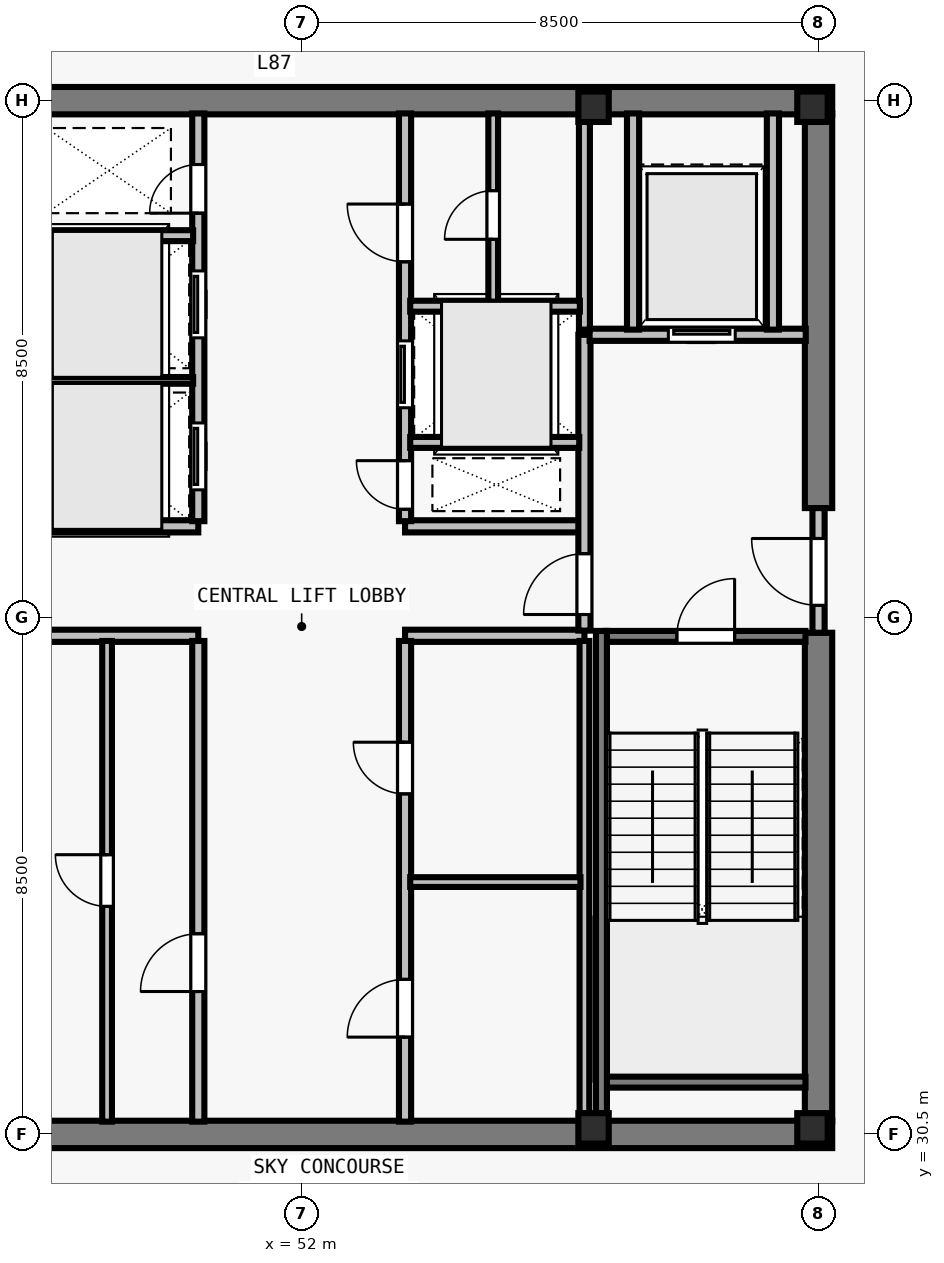
"""IFC4 building model, lengths in metres.
Left out: names, types, materials, properties, quantities, classifications, styles, units other than length and angle.
Written with IfcOpenShell. Run it as: python <this file> out.ifc"""

import sys

from ifc_helpers import new_model, si_unit, direction, frame, frame_2d, origin, origin_2d, place, context, subcontext, project, spatial, rectangle, i_section, extrude, element, fill, save


model = new_model("IFC4")
c1 = context("Model", 3, precision=1e-05, world=origin(), true_north=direction((0.0, 1.0)))
c2 = subcontext(c1, "Body", "Model", "MODEL_VIEW")
j1 = project(units=[si_unit("LENGTHUNIT", "METRE"), si_unit("PLANEANGLEUNIT", "RADIAN")], contexts=[c1])
p1 = place(None, origin())
s1 = spatial("IfcSite", under=j1, at=p1, CompositionType="ELEMENT")
p2 = place(p1, origin())
s2 = spatial("IfcBuilding", under=s1, at=p2, CompositionType="ELEMENT")
p3 = place(p2, frame((0.0, 0.0, 315.5)))
s3 = spatial("IfcBuildingStorey", under=s2, at=p3, CompositionType="ELEMENT", Elevation=315.5)
for number, where, z_axis, x_axis in (
    (1, (56.8, 30.6, 0.0), (0.0, 0.0, 1.0), (1.0, 0.0, 0.0)),
    (2, (60.4, 30.6, 0.0), (0.0, 0.0, 1.0), (1.0, 0.0, 0.0)),
    (3, (56.8, 47.4, 0.0), (0.0, 0.0, 1.0), (1.0, 0.0, 0.0)),
    (4, (60.4, 47.4, 0.0), (0.0, 0.0, 1.0), (1.0, 0.0, 0.0)),
):
    element("IfcColumn", number, at=place(p3, frame(where, z_axis=z_axis, x_axis=x_axis)), inside=s3, PredefinedType="COLUMN", context=c2, shape_type="SweptSolid", body=[
        extrude(i_section(OverallWidth=0.5, OverallDepth=0.5, WebThickness=0.028, FlangeThickness=0.045, at=origin_2d()), origin(), (0.0, 0.0, 1.0), 4.5),
    ])
for number, where, z_axis, x_axis in (
    (5, (43.275, 30.5, 0.0), (0.0, 0.0, 1.0), (1.0, 0.0, 0.0)),
    (6, (43.275, 47.5, 0.0), (0.0, 0.0, 1.0), (1.0, 0.0, 0.0)),
):
    element("IfcWall", number, at=place(p3, frame(where, z_axis=z_axis, x_axis=x_axis)), inside=s3, PredefinedType="SHEAR", context=c2, shape_type="SweptSolid", body=[
        extrude(rectangle(XDim=17.45, YDim=0.45, at=frame_2d((8.725, 0.0))), origin(), (0.0, 0.0, 1.0), 4.29),
    ])
p4 = place(p3, frame((60.5, 30.715, 0.0), z_axis=(0.0, 0.0, 1.0), x_axis=(0.0, 1.0, 0.0)))
e7 = element("IfcWall", 7, at=p4, inside=s3, PredefinedType="SHEAR", context=c2, shape_type="SweptSolid", body=[
    extrude(rectangle(XDim=8.035, YDim=0.45, at=frame_2d((4.018, 0.0))), origin(), (0.0, 0.0, 1.0), 4.29),
])
p5 = place(p3, frame((60.5, 40.8, 0.0), z_axis=(0.0, 0.0, 1.0), x_axis=(0.0, 1.0, 0.0)))
e8 = element("IfcWall", 8, at=p5, inside=s3, PredefinedType="SHEAR", context=c2, shape_type="SweptSolid", body=[
    extrude(rectangle(XDim=6.485, YDim=0.45, at=frame_2d((3.242, 0.0))), origin(), (0.0, 0.0, 1.0), 4.29),
])
for number, where, z_axis, x_axis in (
    (9, (47.35, 38.7, 0.0), (0.0, 0.0, 1.0), (1.0, 0.0, 0.0)),
    (10, (47.35, 40.5, 0.0), (0.0, 0.0, 1.0), (1.0, 0.0, 0.0)),
    (11, (53.7, 38.7, 0.0), (0.0, 0.0, 1.0), (1.0, 0.0, 0.0)),
    (12, (53.7, 40.5, 0.0), (0.0, 0.0, 1.0), (1.0, 0.0, 0.0)),
):
    element("IfcWall", number, at=place(p3, frame(where, z_axis=z_axis, x_axis=x_axis)), inside=s3, PredefinedType="SOLIDWALL", context=c2, shape_type="SweptSolid", body=[
        extrude(rectangle(XDim=2.95, YDim=0.2, at=frame_2d((1.475, 0.0))), origin(), (0.0, 0.0, 1.0), 4.29),
    ])
p6 = place(p3, frame((50.3, 30.71, 0.0), z_axis=(0.0, 0.0, 1.0), x_axis=(0.0, 1.0, 0.0)))
e13 = element("IfcWall", 13, at=p6, inside=s3, PredefinedType="SOLIDWALL", context=c2, shape_type="SweptSolid", body=[
    extrude(rectangle(XDim=7.905, YDim=0.2, at=frame_2d((3.953, 0.0))), origin(), (0.0, 0.0, 1.0), 4.29),
])
p7 = place(p6, frame((2.14, 0.0, 0.0)))
e14 = element("IfcOpeningElement", 14, at=p7, cuts=e13, PredefinedType="OPENING", context=c2, shape_type="SweptSolid", body=[
    extrude(rectangle(XDim=0.95, YDim=2.12, at=frame_2d((0.475, 1.06))), frame((0.0, 0.11, 0.0), z_axis=(0.0, -1.0, 0.0), x_axis=(1.0, 0.0, 0.0)), (0.0, 0.0, 1.0), 0.22),
])
p8 = place(p3, frame((53.7, 30.71, 0.0), z_axis=(0.0, 0.0, 1.0), x_axis=(0.0, 1.0, 0.0)))
e15 = element("IfcWall", 15, at=p8, inside=s3, PredefinedType="SOLIDWALL", context=c2, shape_type="SweptSolid", body=[
    extrude(rectangle(XDim=7.905, YDim=0.2, at=frame_2d((3.953, 0.0))), origin(), (0.0, 0.0, 1.0), 4.29),
])
p9 = place(p8, frame((1.39, 0.0, 0.0)))
e16 = element("IfcOpeningElement", 16, at=p9, cuts=e15, PredefinedType="OPENING", context=c2, shape_type="SweptSolid", body=[
    extrude(rectangle(XDim=0.95, YDim=2.12, at=frame_2d((0.475, 1.06))), frame((0.0, 0.11, 0.0), z_axis=(0.0, -1.0, 0.0), x_axis=(1.0, 0.0, 0.0)), (0.0, 0.0, 1.0), 0.22),
])
p10 = place(p8, frame((5.39, 0.0, 0.0)))
e17 = element("IfcOpeningElement", 17, at=p10, cuts=e15, PredefinedType="OPENING", context=c2, shape_type="SweptSolid", body=[
    extrude(rectangle(XDim=0.85, YDim=2.12, at=frame_2d((0.425, 1.06))), frame((0.0, 0.11, 0.0), z_axis=(0.0, -1.0, 0.0), x_axis=(1.0, 0.0, 0.0)), (0.0, 0.0, 1.0), 0.22),
])
p11 = place(p3, frame((50.3, 40.585, 0.0), z_axis=(0.0, 0.0, 1.0), x_axis=(0.0, 1.0, 0.0)))
e18 = element("IfcWall", 18, at=p11, inside=s3, PredefinedType="SOLIDWALL", context=c2, shape_type="SweptSolid", body=[
    extrude(rectangle(XDim=6.705, YDim=0.2, at=frame_2d((3.353, 0.0))), origin(), (0.0, 0.0, 1.0), 4.29),
])
p12 = place(p11, frame((0.515, 0.0, 0.0)))
e19 = element("IfcOpeningElement", 19, at=p12, cuts=e18, PredefinedType="OPENING", context=c2, shape_type="SweptSolid", body=[
    extrude(rectangle(XDim=1.1, YDim=2.2, at=frame_2d((0.55, 1.1))), frame((0.0, 0.11, 0.0), z_axis=(0.0, -1.0, 0.0), x_axis=(1.0, 0.0, 0.0)), (0.0, 0.0, 1.0), 0.22),
])
p13 = place(p11, frame((3.015, 0.0, 0.0)))
e20 = element("IfcOpeningElement", 20, at=p13, cuts=e18, PredefinedType="OPENING", context=c2, shape_type="SweptSolid", body=[
    extrude(rectangle(XDim=1.1, YDim=2.2, at=frame_2d((0.55, 1.1))), frame((0.0, 0.11, 0.0), z_axis=(0.0, -1.0, 0.0), x_axis=(1.0, 0.0, 0.0)), (0.0, 0.0, 1.0), 0.22),
])
p14 = place(p11, frame((5.065, 0.0, 0.0)))
e21 = element("IfcOpeningElement", 21, at=p14, cuts=e18, PredefinedType="OPENING", context=c2, shape_type="SweptSolid", body=[
    extrude(rectangle(XDim=0.8, YDim=2.08, at=frame_2d((0.4, 1.04))), frame((0.0, 0.11, 0.0), z_axis=(0.0, -1.0, 0.0), x_axis=(1.0, 0.0, 0.0)), (0.0, 0.0, 1.0), 0.22),
])
p15 = place(p3, frame((53.7, 40.585, 0.0), z_axis=(0.0, 0.0, 1.0), x_axis=(0.0, 1.0, 0.0)))
e22 = element("IfcWall", 22, at=p15, inside=s3, PredefinedType="SOLIDWALL", context=c2, shape_type="SweptSolid", body=[
    extrude(rectangle(XDim=6.705, YDim=0.2, at=frame_2d((3.353, 0.0))), origin(), (0.0, 0.0, 1.0), 4.29),
])
p16 = place(p15, frame((0.195, 0.0, 0.0)))
e23 = element("IfcOpeningElement", 23, at=p16, cuts=e22, PredefinedType="OPENING", context=c2, shape_type="SweptSolid", body=[
    extrude(rectangle(XDim=0.8, YDim=2.08, at=frame_2d((0.4, 1.04))), frame((0.0, 0.11, 0.0), z_axis=(0.0, -1.0, 0.0), x_axis=(1.0, 0.0, 0.0)), (0.0, 0.0, 1.0), 0.22),
])
p17 = place(p15, frame((1.865, 0.0, 0.0)))
e24 = element("IfcOpeningElement", 24, at=p17, cuts=e22, PredefinedType="OPENING", context=c2, shape_type="SweptSolid", body=[
    extrude(rectangle(XDim=1.1, YDim=2.2, at=frame_2d((0.55, 1.1))), frame((0.0, 0.11, 0.0), z_axis=(0.0, -1.0, 0.0), x_axis=(1.0, 0.0, 0.0)), (0.0, 0.0, 1.0), 0.22),
])
p18 = place(p15, frame((4.265, 0.0, 0.0)))
e25 = element("IfcOpeningElement", 25, at=p18, cuts=e22, PredefinedType="OPENING", context=c2, shape_type="SweptSolid", body=[
    extrude(rectangle(XDim=0.95, YDim=2.12, at=frame_2d((0.475, 1.06))), frame((0.0, 0.11, 0.0), z_axis=(0.0, -1.0, 0.0), x_axis=(1.0, 0.0, 0.0)), (0.0, 0.0, 1.0), 0.22),
])
p19 = place(p3, frame((60.5, 38.75, 0.0), z_axis=(0.0, 0.0, 1.0), x_axis=(0.0, 1.0, 0.0)))
e26 = element("IfcWall", 26, at=p19, inside=s3, PredefinedType="SOLIDWALL", context=c2, shape_type="SweptSolid", body=[
    extrude(rectangle(XDim=2.05, YDim=0.2, at=frame_2d((1.025, 0.0))), origin(), (0.0, 0.0, 1.0), 4.29),
])
p20 = place(p19, frame((0.45, 0.0, 0.0)))
e27 = element("IfcOpeningElement", 27, at=p20, cuts=e26, PredefinedType="OPENING", context=c2, shape_type="SweptSolid", body=[
    extrude(rectangle(XDim=1.1, YDim=2.15, at=frame_2d((0.55, 1.075))), frame((0.0, 0.11, 0.0), z_axis=(0.0, -1.0, 0.0), x_axis=(1.0, 0.0, 0.0)), (0.0, 0.0, 1.0), 0.22),
])
p21 = place(p3, frame((56.65, 38.785, 0.0), z_axis=(0.0, 0.0, 1.0), x_axis=(0.0, 1.0, 0.0)))
e28 = element("IfcWall", 28, at=p21, inside=s3, PredefinedType="SOLIDWALL", context=c2, shape_type="SweptSolid", body=[
    extrude(rectangle(XDim=4.865, YDim=0.2, at=frame_2d((2.433, 0.0))), origin(), (0.0, 0.0, 1.0), 4.29),
])
p22 = place(p21, frame((0.265, 0.0, 0.0)))
e29 = element("IfcOpeningElement", 29, at=p22, cuts=e28, PredefinedType="OPENING", context=c2, shape_type="SweptSolid", body=[
    extrude(rectangle(XDim=1.0, YDim=2.15, at=frame_2d((0.5, 1.075))), frame((0.0, 0.11, 0.0), z_axis=(0.0, -1.0, 0.0), x_axis=(1.0, 0.0, 0.0)), (0.0, 0.0, 1.0), 0.22),
])
p23 = place(p3, frame((56.735, 43.65, 0.0), z_axis=(0.0, 0.0, 1.0), x_axis=(1.0, 0.0, 0.0)))
e30 = element("IfcWall", 30, at=p23, inside=s3, PredefinedType="SOLIDWALL", context=c2, shape_type="SweptSolid", body=[
    extrude(rectangle(XDim=3.555, YDim=0.2, at=frame_2d((1.777, 0.0))), origin(), (0.0, 0.0, 1.0), 4.29),
])
p24 = place(p23, frame((1.295, 0.0, 0.0)))
e31 = element("IfcOpeningElement", 31, at=p24, cuts=e30, PredefinedType="OPENING", context=c2, shape_type="SweptSolid", body=[
    extrude(rectangle(XDim=1.1, YDim=2.2, at=frame_2d((0.55, 1.1))), frame((0.0, 0.11, 0.0), z_axis=(0.0, -1.0, 0.0), x_axis=(1.0, 0.0, 0.0)), (0.0, 0.0, 1.0), 0.22),
])
for number, where, z_axis, x_axis in (
    (32, (57.45, 43.735, 0.0), (0.0, 0.0, 1.0), (0.0, 1.0, 0.0)),
    (33, (59.75, 43.735, 0.0), (0.0, 0.0, 1.0), (0.0, 1.0, 0.0)),
):
    element("IfcWall", number, at=place(p3, frame(where, z_axis=z_axis, x_axis=x_axis)), inside=s3, PredefinedType="SOLIDWALL", context=c2, shape_type="SweptSolid", body=[
        extrude(rectangle(XDim=3.555, YDim=0.2, at=frame_2d((1.777, 0.0))), origin(), (0.0, 0.0, 1.0), 4.29),
    ])
p25 = place(p3, frame((48.8, 30.71, 0.0), z_axis=(0.0, 0.0, 1.0), x_axis=(0.0, 1.0, 0.0)))
e34 = element("IfcWall", 34, at=p25, inside=s3, PredefinedType="PARTITIONING", context=c2, shape_type="SweptSolid", body=[
    extrude(rectangle(XDim=7.905, YDim=0.16, at=frame_2d((3.953, 0.0))), origin(), (0.0, 0.0, 1.0), 4.29),
])
p26 = place(p25, frame((3.54, 0.0, 0.0)))
e35 = element("IfcOpeningElement", 35, at=p26, cuts=e34, PredefinedType="OPENING", context=c2, shape_type="SweptSolid", body=[
    extrude(rectangle(XDim=0.85, YDim=2.12, at=frame_2d((0.425, 1.06))), frame((0.0, 0.09, 0.0), z_axis=(0.0, -1.0, 0.0), x_axis=(1.0, 0.0, 0.0)), (0.0, 0.0, 1.0), 0.18),
])
p27 = place(p3, frame((56.65, 30.71, 0.0), z_axis=(0.0, 0.0, 1.0), x_axis=(0.0, 1.0, 0.0)))
e36 = element("IfcWall", 36, at=p27, inside=s3, PredefinedType="PARTITIONING", context=c2, shape_type="SweptSolid", body=[
    extrude(rectangle(XDim=7.905, YDim=0.16, at=frame_2d((3.953, 0.0))), origin(), (0.0, 0.0, 1.0), 4.29),
])
p28 = place(p3, frame((53.785, 34.65, 0.0), z_axis=(0.0, 0.0, 1.0), x_axis=(1.0, 0.0, 0.0)))
e37 = element("IfcWall", 37, at=p28, inside=s3, PredefinedType="PARTITIONING", context=c2, shape_type="SweptSolid", body=[
    extrude(rectangle(XDim=2.8, YDim=0.16, at=frame_2d((1.4, 0.0))), origin(), (0.0, 0.0, 1.0), 4.29),
])
p29 = place(p3, frame((47.435, 42.9, 0.0), z_axis=(0.0, 0.0, 1.0), x_axis=(1.0, 0.0, 0.0)))
e38 = element("IfcWall", 38, at=p29, inside=s3, PredefinedType="PARTITIONING", context=c2, shape_type="SweptSolid", body=[
    extrude(rectangle(XDim=2.78, YDim=0.11, at=frame_2d((1.39, 0.0))), origin(), (0.0, 0.0, 1.0), 4.29),
])
p30 = place(p3, frame((47.425, 45.28, 0.0), z_axis=(0.0, 0.0, 1.0), x_axis=(1.0, 0.0, 0.0)))
e39 = element("IfcWall", 39, at=p30, inside=s3, PredefinedType="SOLIDWALL", context=c2, shape_type="SweptSolid", body=[
    extrude(rectangle(XDim=2.79, YDim=0.18, at=frame_2d((1.395, 0.0))), origin(), (0.0, 0.0, 1.0), 4.29),
])
p31 = place(p3, frame((56.65, 43.735, 0.0), z_axis=(0.0, 0.0, 1.0), x_axis=(0.0, 1.0, 0.0)))
e40 = element("IfcWall", 40, at=p31, inside=s3, PredefinedType="SOLIDWALL", context=c2, shape_type="SweptSolid", body=[
    extrude(rectangle(XDim=3.555, YDim=0.18, at=frame_2d((1.777, 0.0))), origin(), (0.0, 0.0, 1.0), 4.29),
])
p32 = place(p3, frame((53.785, 41.88, 0.0), z_axis=(0.0, 0.0, 1.0), x_axis=(1.0, 0.0, 0.0)))
e41 = element("IfcWall", 41, at=p32, inside=s3, PredefinedType="SOLIDWALL", context=c2, shape_type="SweptSolid", body=[
    extrude(rectangle(XDim=2.78, YDim=0.18, at=frame_2d((1.39, 0.0))), origin(), (0.0, 0.0, 1.0), 4.29),
])
p33 = place(p3, frame((53.785, 44.12, 0.0), z_axis=(0.0, 0.0, 1.0), x_axis=(1.0, 0.0, 0.0)))
e42 = element("IfcWall", 42, at=p33, inside=s3, PredefinedType="SOLIDWALL", context=c2, shape_type="SweptSolid", body=[
    extrude(rectangle(XDim=2.79, YDim=0.18, at=frame_2d((1.395, 0.0))), origin(), (0.0, 0.0, 1.0), 4.29),
])
p34 = place(p3, frame((55.15, 44.195, 0.0), z_axis=(0.0, 0.0, 1.0), x_axis=(0.0, 1.0, 0.0)))
e43 = element("IfcWall", 43, at=p34, inside=s3, PredefinedType="PARTITIONING", context=c2, shape_type="SweptSolid", body=[
    extrude(rectangle(XDim=3.095, YDim=0.16, at=frame_2d((1.547, 0.0))), origin(), (0.0, 0.0, 1.0), 4.29),
])
p35 = place(p34, frame((1.025, 0.0, 0.0)))
e44 = element("IfcOpeningElement", 44, at=p35, cuts=e43, PredefinedType="OPENING", context=c2, shape_type="SweptSolid", body=[
    extrude(rectangle(XDim=0.8, YDim=2.1, at=frame_2d((0.4, 1.05))), frame((0.0, 0.09, 0.0), z_axis=(0.0, -1.0, 0.0), x_axis=(1.0, 0.0, 0.0)), (0.0, 0.0, 1.0), 0.18),
])
p36 = place(p3, frame((57.005, 38.69, 0.0), z_axis=(0.0, 0.0, 1.0), x_axis=(1.0, 0.0, 0.0)))
e45 = element("IfcWall", 45, at=p36, inside=s3, PredefinedType="SOLIDWALL", context=c2, shape_type="SweptSolid", body=[
    extrude(rectangle(XDim=3.28, YDim=0.18, at=frame_2d((1.64, 0.0))), origin(), (0.0, 0.0, 1.0), 4.29),
])
p37 = place(p36, frame((1.165, 0.0, 0.0)))
e46 = element("IfcOpeningElement", 46, at=p37, cuts=e45, PredefinedType="OPENING", context=c2, shape_type="SweptSolid", body=[
    extrude(rectangle(XDim=0.95, YDim=2.15, at=frame_2d((0.475, 1.075))), frame((0.0, 0.1, 0.0), z_axis=(0.0, -1.0, 0.0), x_axis=(1.0, 0.0, 0.0)), (0.0, 0.0, 1.0), 0.2),
])
p38 = place(p3, frame((57.005, 31.36, 0.0), z_axis=(0.0, 0.0, 1.0), x_axis=(1.0, 0.0, 0.0)))
e47 = element("IfcWall", 47, at=p38, inside=s3, PredefinedType="SOLIDWALL", context=c2, shape_type="SweptSolid", body=[
    extrude(rectangle(XDim=3.28, YDim=0.18, at=frame_2d((1.64, 0.0))), origin(), (0.0, 0.0, 1.0), 4.29),
])
p39 = place(p3, frame((56.93, 38.78, 0.0), z_axis=(0.0, 0.0, 1.0), x_axis=(0.0, -1.0, 0.0)))
e48 = element("IfcWall", 48, at=p39, inside=s3, PredefinedType="SOLIDWALL", context=c2, shape_type="SweptSolid", body=[
    extrude(rectangle(XDim=8.067, YDim=0.18, at=frame_2d((4.034, 0.0))), origin(), (0.0, 0.0, 1.0), 4.29),
])
p40 = place(p20, origin())
e49 = element("IfcDoor", 49, at=p40, inside=s3, OperationType="SINGLE_SWING_RIGHT", PredefinedType="DOOR", context=c2, shape_type="SweptSolid", body=[
    extrude(rectangle(XDim=1.1, YDim=2.15, at=frame_2d((0.55, 1.075))), frame((0.0, 0.025, 0.0), z_axis=(0.0, -1.0, 0.0), x_axis=(1.0, 0.0, 0.0)), (0.0, 0.0, 1.0), 0.05),
])
fill(e27, e49)
p41 = place(p22, origin())
e50 = element("IfcDoor", 50, at=p41, inside=s3, OperationType="SINGLE_SWING_LEFT", PredefinedType="DOOR", context=c2, shape_type="SweptSolid", body=[
    extrude(rectangle(XDim=1.0, YDim=2.15, at=frame_2d((0.5, 1.075))), frame((0.0, 0.025, 0.0), z_axis=(0.0, -1.0, 0.0), x_axis=(1.0, 0.0, 0.0)), (0.0, 0.0, 1.0), 0.05),
])
fill(e29, e50)
p42 = place(p24, origin())
e51 = element("IfcDoor", 51, at=p42, inside=s3, OperationType="SLIDING_TO_LEFT", PredefinedType="DOOR", context=c2, shape_type="SweptSolid", body=[
    extrude(rectangle(XDim=1.1, YDim=2.2, at=frame_2d((0.55, 1.1))), frame((0.0, 0.025, 0.0), z_axis=(0.0, -1.0, 0.0), x_axis=(1.0, 0.0, 0.0)), (0.0, 0.0, 1.0), 0.05),
])
fill(e31, e51)
p43 = place(p7, origin())
e52 = element("IfcDoor", 52, at=p43, inside=s3, OperationType="SINGLE_SWING_LEFT", PredefinedType="DOOR", context=c2, shape_type="SweptSolid", body=[
    extrude(rectangle(XDim=0.95, YDim=2.12, at=frame_2d((0.475, 1.06))), frame((0.0, 0.025, 0.0), z_axis=(0.0, -1.0, 0.0), x_axis=(1.0, 0.0, 0.0)), (0.0, 0.0, 1.0), 0.05),
])
fill(e14, e52)
p44 = place(p26, origin())
e53 = element("IfcDoor", 53, at=p44, inside=s3, OperationType="SINGLE_SWING_RIGHT", PredefinedType="DOOR", context=c2, shape_type="SweptSolid", body=[
    extrude(rectangle(XDim=0.85, YDim=2.12, at=frame_2d((0.425, 1.06))), frame((0.0, 0.025, 0.0), z_axis=(0.0, -1.0, 0.0), x_axis=(1.0, 0.0, 0.0)), (0.0, 0.0, 1.0), 0.05),
])
fill(e35, e53)
p45 = place(p9, origin())
e54 = element("IfcDoor", 54, at=p45, inside=s3, OperationType="SINGLE_SWING_LEFT", PredefinedType="DOOR", context=c2, shape_type="SweptSolid", body=[
    extrude(rectangle(XDim=0.95, YDim=2.12, at=frame_2d((0.475, 1.06))), frame((0.0, 0.025, 0.0), z_axis=(0.0, -1.0, 0.0), x_axis=(1.0, 0.0, 0.0)), (0.0, 0.0, 1.0), 0.05),
])
fill(e16, e54)
p46 = place(p10, origin())
e55 = element("IfcDoor", 55, at=p46, inside=s3, OperationType="SINGLE_SWING_RIGHT", PredefinedType="DOOR", context=c2, shape_type="SweptSolid", body=[
    extrude(rectangle(XDim=0.85, YDim=2.12, at=frame_2d((0.425, 1.06))), frame((0.0, 0.025, 0.0), z_axis=(0.0, -1.0, 0.0), x_axis=(1.0, 0.0, 0.0)), (0.0, 0.0, 1.0), 0.05),
])
fill(e17, e55)
p47 = place(p12, origin())
e56 = element("IfcDoor", 56, at=p47, inside=s3, OperationType="SLIDING_TO_LEFT", PredefinedType="DOOR", context=c2, shape_type="SweptSolid", body=[
    extrude(rectangle(XDim=1.1, YDim=2.2, at=frame_2d((0.55, 1.1))), frame((0.0, 0.025, 0.0), z_axis=(0.0, -1.0, 0.0), x_axis=(1.0, 0.0, 0.0)), (0.0, 0.0, 1.0), 0.05),
])
fill(e19, e56)
p48 = place(p13, origin())
e57 = element("IfcDoor", 57, at=p48, inside=s3, OperationType="SLIDING_TO_LEFT", PredefinedType="DOOR", context=c2, shape_type="SweptSolid", body=[
    extrude(rectangle(XDim=1.1, YDim=2.2, at=frame_2d((0.55, 1.1))), frame((0.0, 0.025, 0.0), z_axis=(0.0, -1.0, 0.0), x_axis=(1.0, 0.0, 0.0)), (0.0, 0.0, 1.0), 0.05),
])
fill(e20, e57)
p49 = place(p14, origin())
e58 = element("IfcDoor", 58, at=p49, inside=s3, OperationType="SINGLE_SWING_LEFT", PredefinedType="DOOR", context=c2, shape_type="SweptSolid", body=[
    extrude(rectangle(XDim=0.8, YDim=2.08, at=frame_2d((0.4, 1.04))), frame((0.0, 0.025, 0.0), z_axis=(0.0, -1.0, 0.0), x_axis=(1.0, 0.0, 0.0)), (0.0, 0.0, 1.0), 0.05),
])
fill(e21, e58)
p50 = place(p16, origin())
e59 = element("IfcDoor", 59, at=p50, inside=s3, OperationType="SINGLE_SWING_RIGHT", PredefinedType="DOOR", context=c2, shape_type="SweptSolid", body=[
    extrude(rectangle(XDim=0.8, YDim=2.08, at=frame_2d((0.4, 1.04))), frame((0.0, 0.025, 0.0), z_axis=(0.0, -1.0, 0.0), x_axis=(1.0, 0.0, 0.0)), (0.0, 0.0, 1.0), 0.05),
])
fill(e23, e59)
p51 = place(p17, origin())
e60 = element("IfcDoor", 60, at=p51, inside=s3, OperationType="SLIDING_TO_LEFT", PredefinedType="DOOR", context=c2, shape_type="SweptSolid", body=[
    extrude(rectangle(XDim=1.1, YDim=2.2, at=frame_2d((0.55, 1.1))), frame((0.0, 0.025, 0.0), z_axis=(0.0, -1.0, 0.0), x_axis=(1.0, 0.0, 0.0)), (0.0, 0.0, 1.0), 0.05),
])
fill(e24, e60)
p52 = place(p18, origin())
e61 = element("IfcDoor", 61, at=p52, inside=s3, OperationType="SINGLE_SWING_RIGHT", PredefinedType="DOOR", context=c2, shape_type="SweptSolid", body=[
    extrude(rectangle(XDim=0.95, YDim=2.12, at=frame_2d((0.475, 1.06))), frame((0.0, 0.025, 0.0), z_axis=(0.0, -1.0, 0.0), x_axis=(1.0, 0.0, 0.0)), (0.0, 0.0, 1.0), 0.05),
])
fill(e25, e61)
p53 = place(p35, origin())
e62 = element("IfcDoor", 62, at=p53, inside=s3, OperationType="SINGLE_SWING_LEFT", PredefinedType="DOOR", context=c2, shape_type="SweptSolid", body=[
    extrude(rectangle(XDim=0.8, YDim=2.1, at=frame_2d((0.4, 1.05))), frame((0.0, 0.025, 0.0), z_axis=(0.0, -1.0, 0.0), x_axis=(1.0, 0.0, 0.0)), (0.0, 0.0, 1.0), 0.05),
])
fill(e44, e62)
p54 = place(p37, origin())
e63 = element("IfcDoor", 63, at=p54, inside=s3, OperationType="SINGLE_SWING_RIGHT", PredefinedType="DOOR", context=c2, shape_type="SweptSolid", body=[
    extrude(rectangle(XDim=0.95, YDim=2.15, at=frame_2d((0.475, 1.075))), frame((0.0, 0.025, 0.0), z_axis=(0.0, -1.0, 0.0), x_axis=(1.0, 0.0, 0.0)), (0.0, 0.0, 1.0), 0.05),
])
fill(e46, e63)
save(model, sys.argv[1])
